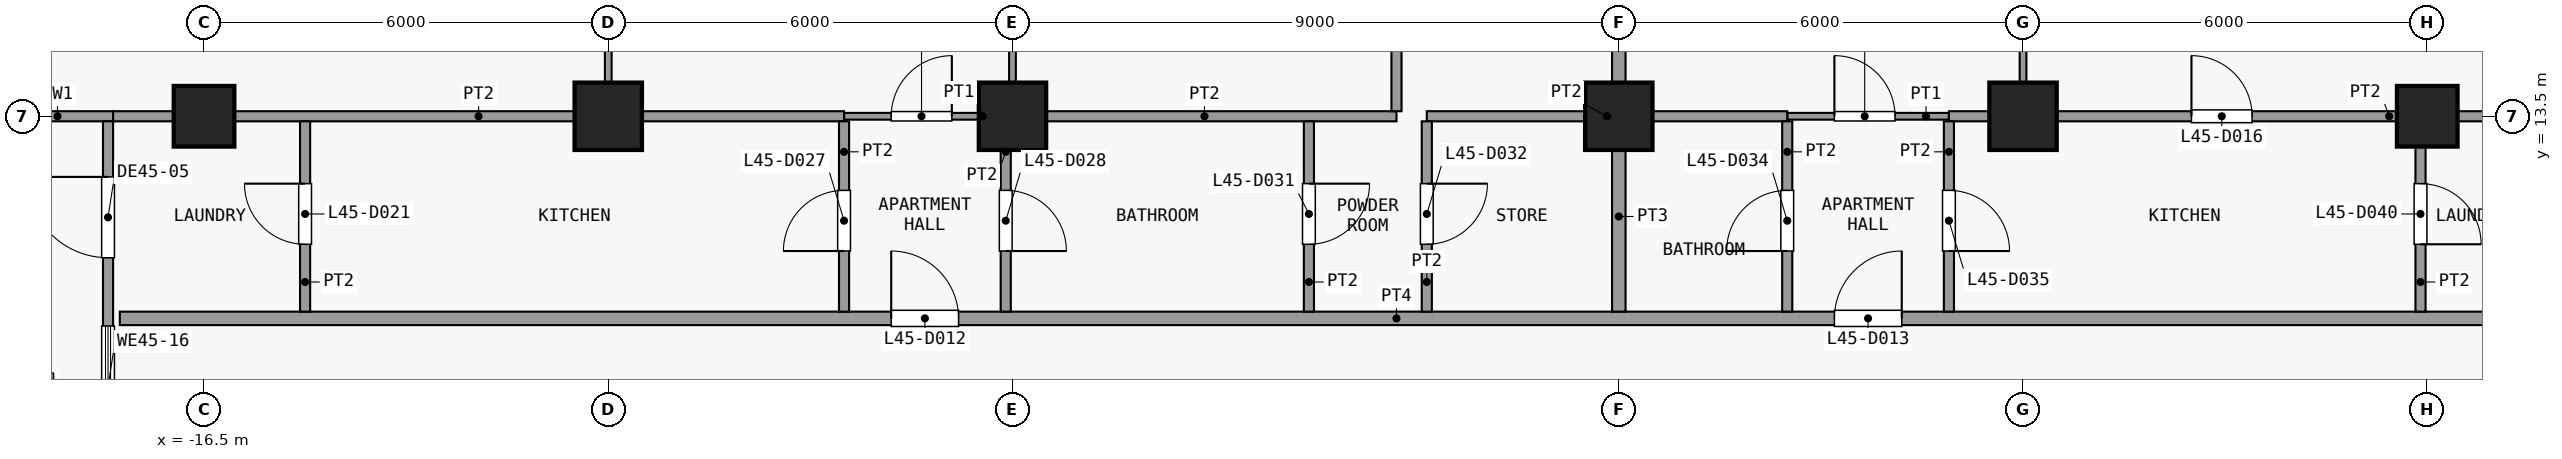
"""IFC4 building model, lengths in metres.
Left out: names, types, materials, properties, quantities, classifications, styles, units other than length and angle.
Written with IfcOpenShell. Run it as: python <this file> out.ifc"""

import sys

from ifc_helpers import new_model, si_unit, direction, frame, frame_2d, origin, origin_2d, place, context, subcontext, project, spatial, rectangle, extrude, element, fill, save


model = new_model("IFC4")
c1 = context("Model", 3, precision=1e-05, world=origin(), true_north=direction((0.0, 1.0)))
c2 = subcontext(c1, "Body", "Model", "MODEL_VIEW")
j1 = project(units=[si_unit("LENGTHUNIT", "METRE"), si_unit("PLANEANGLEUNIT", "RADIAN")], contexts=[c1])
p1 = place(None, origin())
s1 = spatial("IfcSite", under=j1, at=p1, CompositionType="ELEMENT")
p2 = place(p1, origin())
s2 = spatial("IfcBuilding", under=s1, at=p2, CompositionType="ELEMENT")
p3 = place(p2, frame((0.0, 0.0, 181.7)))
s3 = spatial("IfcBuildingStorey", under=s2, at=p3, CompositionType="ELEMENT", Elevation=181.7)
p4 = place(p3, frame((-16.5, 13.5, 0.0), z_axis=(0.0, 0.0, 1.0), x_axis=(1.0, 0.0, 0.0)))
e1 = element("IfcColumn", 1, at=p4, inside=s3, PredefinedType="COLUMN", context=c2, shape_type="SweptSolid", body=[
    extrude(rectangle(XDim=0.9, YDim=0.9, at=origin_2d()), origin(), (0.0, 0.0, 1.0), 3.6),
])
for number, where, z_axis, x_axis in (
    (2, (-10.5, 13.5, 0.0), (0.0, 0.0, 1.0), (1.0, 0.0, 0.0)),
    (3, (-4.5, 13.5, 0.0), (0.0, 0.0, 1.0), (1.0, 0.0, 0.0)),
    (4, (4.5, 13.5, 0.0), (0.0, 0.0, 1.0), (1.0, 0.0, 0.0)),
    (5, (10.5, 13.5, 0.0), (0.0, 0.0, 1.0), (1.0, 0.0, 0.0)),
):
    element("IfcColumn", number, at=place(p3, frame(where, z_axis=z_axis, x_axis=x_axis)), inside=s3, PredefinedType="COLUMN", context=c2, shape_type="SweptSolid", body=[
        extrude(rectangle(XDim=1.0, YDim=1.0, at=origin_2d()), origin(), (0.0, 0.0, 1.0), 3.6),
    ])
p5 = place(p3, frame((16.5, 13.5, 0.0), z_axis=(0.0, 0.0, 1.0), x_axis=(1.0, 0.0, 0.0)))
e6 = element("IfcColumn", 6, at=p5, inside=s3, PredefinedType="COLUMN", context=c2, shape_type="SweptSolid", body=[
    extrude(rectangle(XDim=0.9, YDim=0.9, at=origin_2d()), origin(), (0.0, 0.0, 1.0), 3.6),
])
p6 = place(p3, frame((-17.85, 13.5, 0.0), z_axis=(0.0, 0.0, 1.0), x_axis=(-1.0, 0.0, 0.0)))
e7 = element("IfcWall", 7, at=p6, inside=s3, PredefinedType="SOLIDWALL", context=c2, shape_type="SweptSolid", body=[
    extrude(rectangle(XDim=1.65, YDim=0.15, at=frame_2d((0.825, 0.0))), origin(), (0.0, 0.0, 1.0), 3.3),
])
p7 = place(p3, frame((-17.925, 7.575, 0.0), z_axis=(0.0, 0.0, 1.0), x_axis=(0.0, 1.0, 0.0)))
e8 = element("IfcWall", 8, at=p7, inside=s3, PredefinedType="SOLIDWALL", context=c2, shape_type="SweptSolid", body=[
    extrude(rectangle(XDim=5.85, YDim=0.15, at=frame_2d((2.925, 0.0))), origin(), (0.0, 0.0, 1.0), 3.3),
])
p8 = place(p7, frame((3.825, 0.0, 0.0)))
e9 = element("IfcOpeningElement", 9, at=p8, cuts=e8, PredefinedType="OPENING", context=c2, shape_type="SweptSolid", body=[
    extrude(rectangle(XDim=1.2, YDim=2.4, at=frame_2d((0.6, 1.2))), frame((0.0, 0.085, 0.0), z_axis=(0.0, -1.0, 0.0), x_axis=(1.0, 0.0, 0.0)), (0.0, 0.0, 1.0), 0.17),
])
p9 = place(p7, frame((1.012, 0.0, 0.9)))
e10 = element("IfcOpeningElement", 10, at=p9, cuts=e8, PredefinedType="OPENING", context=c2, shape_type="SweptSolid", body=[
    extrude(rectangle(XDim=1.8, YDim=2.1, at=frame_2d((0.9, 1.05))), frame((0.0, 0.085, 0.0), z_axis=(0.0, -1.0, 0.0), x_axis=(1.0, 0.0, 0.0)), (0.0, 0.0, 1.0), 0.17),
])
p10 = place(p3, frame((-17.75, 10.5, 0.0), z_axis=(0.0, 0.0, 1.0), x_axis=(1.0, 0.0, 0.0)))
e11 = element("IfcWall", 11, at=p10, inside=s3, PredefinedType="PARTITIONING", context=c2, shape_type="SweptSolid", body=[
    extrude(rectangle(XDim=35.6, YDim=0.2, at=frame_2d((17.8, 0.0))), origin(), (0.0, 0.0, 1.0), 3.3),
])
p11 = place(p10, frame((11.45, 0.0, 0.0)))
e12 = element("IfcOpeningElement", 12, at=p11, cuts=e11, PredefinedType="OPENING", context=c2, shape_type="SweptSolid", body=[
    extrude(rectangle(XDim=1.0, YDim=2.1, at=frame_2d((0.5, 1.05))), frame((0.0, 0.11, 0.0), z_axis=(0.0, -1.0, 0.0), x_axis=(1.0, 0.0, 0.0)), (0.0, 0.0, 1.0), 0.22),
])
p12 = place(p10, frame((25.45, 0.0, 0.0)))
e13 = element("IfcOpeningElement", 13, at=p12, cuts=e11, PredefinedType="OPENING", context=c2, shape_type="SweptSolid", body=[
    extrude(rectangle(XDim=1.0, YDim=2.1, at=frame_2d((0.5, 1.05))), frame((0.0, 0.11, 0.0), z_axis=(0.0, -1.0, 0.0), x_axis=(1.0, 0.0, 0.0)), (0.0, 0.0, 1.0), 0.22),
])
p13 = place(p3, frame((-7.0, 13.5, 0.0), z_axis=(0.0, 0.0, 1.0), x_axis=(1.0, 0.0, 0.0)))
e14 = element("IfcWall", 14, at=p13, inside=s3, PredefinedType="PARTITIONING", context=c2, shape_type="SweptSolid", body=[
    extrude(rectangle(XDim=2.4, YDim=0.1, at=frame_2d((1.2, 0.0))), origin(), (0.0, 0.0, 1.0), 3.3),
])
p14 = place(p13, frame((0.7, 0.0, 0.0)))
e15 = element("IfcOpeningElement", 15, at=p14, cuts=e14, PredefinedType="OPENING", context=c2, shape_type="SweptSolid", body=[
    extrude(rectangle(XDim=0.9, YDim=2.1, at=frame_2d((0.45, 1.05))), frame((0.0, 0.06, 0.0), z_axis=(0.0, -1.0, 0.0), x_axis=(1.0, 0.0, 0.0)), (0.0, 0.0, 1.0), 0.12),
])
p15 = place(p3, frame((7.0, 13.5, 0.0), z_axis=(0.0, 0.0, 1.0), x_axis=(1.0, 0.0, 0.0)))
e16 = element("IfcWall", 16, at=p15, inside=s3, PredefinedType="PARTITIONING", context=c2, shape_type="SweptSolid", body=[
    extrude(rectangle(XDim=2.4, YDim=0.1, at=frame_2d((1.2, 0.0))), origin(), (0.0, 0.0, 1.0), 3.3),
])
p16 = place(p15, frame((0.7, 0.0, 0.0)))
e17 = element("IfcOpeningElement", 17, at=p16, cuts=e16, PredefinedType="OPENING", context=c2, shape_type="SweptSolid", body=[
    extrude(rectangle(XDim=0.9, YDim=2.1, at=frame_2d((0.45, 1.05))), frame((0.0, 0.06, 0.0), z_axis=(0.0, -1.0, 0.0), x_axis=(1.0, 0.0, 0.0)), (0.0, 0.0, 1.0), 0.12),
])
p17 = place(p3, frame((-17.85, 13.5, 0.0), z_axis=(0.0, 0.0, 1.0), x_axis=(1.0, 0.0, 0.0)))
e18 = element("IfcWall", 18, at=p17, inside=s3, PredefinedType="PARTITIONING", context=c2, shape_type="SweptSolid", body=[
    extrude(rectangle(XDim=10.85, YDim=0.15, at=frame_2d((5.425, 0.0))), origin(), (0.0, 0.0, 1.0), 3.3),
])
p18 = place(p3, frame((-4.5, 13.5, 0.0), z_axis=(0.0, 0.0, 1.0), x_axis=(1.0, 0.0, 0.0)))
e19 = element("IfcWall", 19, at=p18, inside=s3, PredefinedType="PARTITIONING", context=c2, shape_type="SweptSolid", body=[
    extrude(rectangle(XDim=5.7, YDim=0.15, at=frame_2d((2.85, 0.0))), origin(), (0.0, 0.0, 1.0), 3.3),
])
p19 = place(p3, frame((1.65, 13.5, 0.0), z_axis=(0.0, 0.0, 1.0), x_axis=(1.0, 0.0, 0.0)))
e20 = element("IfcWall", 20, at=p19, inside=s3, PredefinedType="PARTITIONING", context=c2, shape_type="SweptSolid", body=[
    extrude(rectangle(XDim=5.35, YDim=0.15, at=frame_2d((2.675, 0.0))), origin(), (0.0, 0.0, 1.0), 3.3),
])
p20 = place(p3, frame((9.4, 13.5, 0.0), z_axis=(0.0, 0.0, 1.0), x_axis=(1.0, 0.0, 0.0)))
e21 = element("IfcWall", 21, at=p20, inside=s3, PredefinedType="PARTITIONING", context=c2, shape_type="SweptSolid", body=[
    extrude(rectangle(XDim=8.45, YDim=0.15, at=frame_2d((4.225, 0.0))), origin(), (0.0, 0.0, 1.0), 3.3),
])
p21 = place(p20, frame((3.6, 0.0, 0.0)))
e22 = element("IfcOpeningElement", 22, at=p21, cuts=e21, PredefinedType="OPENING", context=c2, shape_type="SweptSolid", body=[
    extrude(rectangle(XDim=0.9, YDim=2.1, at=frame_2d((0.45, 1.05))), frame((0.0, 0.085, 0.0), z_axis=(0.0, -1.0, 0.0), x_axis=(1.0, 0.0, 0.0)), (0.0, 0.0, 1.0), 0.17),
])
p22 = place(p3, frame((-15.0, 10.6, 0.0), z_axis=(0.0, 0.0, 1.0), x_axis=(0.0, 1.0, 0.0)))
e23 = element("IfcWall", 23, at=p22, inside=s3, PredefinedType="PARTITIONING", context=c2, shape_type="SweptSolid", body=[
    extrude(rectangle(XDim=2.825, YDim=0.15, at=frame_2d((1.413, 0.0))), origin(), (0.0, 0.0, 1.0), 3.3),
])
p23 = place(p22, frame((1.0, 0.0, 0.0)))
e24 = element("IfcOpeningElement", 24, at=p23, cuts=e23, PredefinedType="OPENING", context=c2, shape_type="SweptSolid", body=[
    extrude(rectangle(XDim=0.9, YDim=2.1, at=frame_2d((0.45, 1.05))), frame((0.0, 0.085, 0.0), z_axis=(0.0, -1.0, 0.0), x_axis=(1.0, 0.0, 0.0)), (0.0, 0.0, 1.0), 0.17),
])
p24 = place(p3, frame((-10.5, 13.575, 0.0), z_axis=(0.0, 0.0, 1.0), x_axis=(0.0, 1.0, 0.0)))
e25 = element("IfcWall", 25, at=p24, inside=s3, PredefinedType="PARTITIONING", context=c2, shape_type="SweptSolid", body=[
    extrude(rectangle(XDim=7.275, YDim=0.1, at=frame_2d((3.638, 0.0))), origin(), (0.0, 0.0, 1.0), 3.3),
])
p25 = place(p24, frame((2.0, 0.0, 0.0)))
e26 = element("IfcOpeningElement", 26, at=p25, cuts=e25, PredefinedType="OPENING", context=c2, shape_type="SweptSolid", body=[
    extrude(rectangle(XDim=0.9, YDim=2.1, at=frame_2d((0.45, 1.05))), frame((0.0, 0.06, 0.0), z_axis=(0.0, -1.0, 0.0), x_axis=(1.0, 0.0, 0.0)), (0.0, 0.0, 1.0), 0.12),
])
p26 = place(p3, frame((-7.0, 10.6, 0.0), z_axis=(0.0, 0.0, 1.0), x_axis=(0.0, 1.0, 0.0)))
e27 = element("IfcWall", 27, at=p26, inside=s3, PredefinedType="PARTITIONING", context=c2, shape_type="SweptSolid", body=[
    extrude(rectangle(XDim=2.825, YDim=0.15, at=frame_2d((1.413, 0.0))), origin(), (0.0, 0.0, 1.0), 3.3),
])
p27 = place(p26, frame((0.9, 0.0, 0.0)))
e28 = element("IfcOpeningElement", 28, at=p27, cuts=e27, PredefinedType="OPENING", context=c2, shape_type="SweptSolid", body=[
    extrude(rectangle(XDim=0.9, YDim=2.1, at=frame_2d((0.45, 1.05))), frame((0.0, 0.085, 0.0), z_axis=(0.0, -1.0, 0.0), x_axis=(1.0, 0.0, 0.0)), (0.0, 0.0, 1.0), 0.17),
])
p28 = place(p3, frame((-4.6, 10.6, 0.0), z_axis=(0.0, 0.0, 1.0), x_axis=(0.0, 1.0, 0.0)))
e29 = element("IfcWall", 29, at=p28, inside=s3, PredefinedType="PARTITIONING", context=c2, shape_type="SweptSolid", body=[
    extrude(rectangle(XDim=2.825, YDim=0.15, at=frame_2d((1.413, 0.0))), origin(), (0.0, 0.0, 1.0), 3.3),
])
p29 = place(p28, frame((0.9, 0.0, 0.0)))
e30 = element("IfcOpeningElement", 30, at=p29, cuts=e29, PredefinedType="OPENING", context=c2, shape_type="SweptSolid", body=[
    extrude(rectangle(XDim=0.9, YDim=2.1, at=frame_2d((0.45, 1.05))), frame((0.0, 0.085, 0.0), z_axis=(0.0, -1.0, 0.0), x_axis=(1.0, 0.0, 0.0)), (0.0, 0.0, 1.0), 0.17),
])
p30 = place(p3, frame((-4.5, 13.575, 0.0), z_axis=(0.0, 0.0, 1.0), x_axis=(0.0, 1.0, 0.0)))
e31 = element("IfcWall", 31, at=p30, inside=s3, PredefinedType="PARTITIONING", context=c2, shape_type="SweptSolid", body=[
    extrude(rectangle(XDim=7.275, YDim=0.1, at=frame_2d((3.638, 0.0))), origin(), (0.0, 0.0, 1.0), 3.3),
])
p31 = place(p30, frame((2.0, 0.0, 0.0)))
e32 = element("IfcOpeningElement", 32, at=p31, cuts=e31, PredefinedType="OPENING", context=c2, shape_type="SweptSolid", body=[
    extrude(rectangle(XDim=0.9, YDim=2.1, at=frame_2d((0.45, 1.05))), frame((0.0, 0.06, 0.0), z_axis=(0.0, -1.0, 0.0), x_axis=(1.0, 0.0, 0.0)), (0.0, 0.0, 1.0), 0.12),
])
p32 = place(p3, frame((-0.1, 10.6, 0.0), z_axis=(0.0, 0.0, 1.0), x_axis=(0.0, 1.0, 0.0)))
e33 = element("IfcWall", 33, at=p32, inside=s3, PredefinedType="PARTITIONING", context=c2, shape_type="SweptSolid", body=[
    extrude(rectangle(XDim=2.825, YDim=0.15, at=frame_2d((1.413, 0.0))), origin(), (0.0, 0.0, 1.0), 3.3),
])
p33 = place(p32, frame((1.0, 0.0, 0.0)))
e34 = element("IfcOpeningElement", 34, at=p33, cuts=e33, PredefinedType="OPENING", context=c2, shape_type="SweptSolid", body=[
    extrude(rectangle(XDim=0.9, YDim=2.1, at=frame_2d((0.45, 1.05))), frame((0.0, 0.085, 0.0), z_axis=(0.0, -1.0, 0.0), x_axis=(1.0, 0.0, 0.0)), (0.0, 0.0, 1.0), 0.17),
])
p34 = place(p3, frame((1.2, 13.575, 0.0), z_axis=(0.0, 0.0, 1.0), x_axis=(0.0, 1.0, 0.0)))
e35 = element("IfcWall", 35, at=p34, inside=s3, PredefinedType="PARTITIONING", context=c2, shape_type="SweptSolid", body=[
    extrude(rectangle(XDim=4.85, YDim=0.15, at=frame_2d((2.425, 0.0))), origin(), (0.0, 0.0, 1.0), 3.3),
])
p35 = place(p3, frame((1.65, 10.6, 0.0), z_axis=(0.0, 0.0, 1.0), x_axis=(0.0, 1.0, 0.0)))
e36 = element("IfcWall", 36, at=p35, inside=s3, PredefinedType="PARTITIONING", context=c2, shape_type="SweptSolid", body=[
    extrude(rectangle(XDim=2.825, YDim=0.15, at=frame_2d((1.413, 0.0))), origin(), (0.0, 0.0, 1.0), 3.3),
])
p36 = place(p35, frame((1.0, 0.0, 0.0)))
e37 = element("IfcOpeningElement", 37, at=p36, cuts=e36, PredefinedType="OPENING", context=c2, shape_type="SweptSolid", body=[
    extrude(rectangle(XDim=0.9, YDim=2.1, at=frame_2d((0.45, 1.05))), frame((0.0, 0.085, 0.0), z_axis=(0.0, -1.0, 0.0), x_axis=(1.0, 0.0, 0.0)), (0.0, 0.0, 1.0), 0.17),
])
p37 = place(p3, frame((4.5, 10.6, 0.0), z_axis=(0.0, 0.0, 1.0), x_axis=(0.0, 1.0, 0.0)))
e38 = element("IfcWall", 38, at=p37, inside=s3, PredefinedType="PARTITIONING", context=c2, shape_type="SweptSolid", body=[
    extrude(rectangle(XDim=2.825, YDim=0.2, at=frame_2d((1.413, 0.0))), origin(), (0.0, 0.0, 1.0), 3.3),
])
p38 = place(p3, frame((4.5, 13.575, 0.0), z_axis=(0.0, 0.0, 1.0), x_axis=(0.0, 1.0, 0.0)))
e39 = element("IfcWall", 39, at=p38, inside=s3, PredefinedType="PARTITIONING", context=c2, shape_type="SweptSolid", body=[
    extrude(rectangle(XDim=7.275, YDim=0.2, at=frame_2d((3.638, 0.0))), origin(), (0.0, 0.0, 1.0), 3.3),
])
p39 = place(p3, frame((7.0, 10.6, 0.0), z_axis=(0.0, 0.0, 1.0), x_axis=(0.0, 1.0, 0.0)))
e40 = element("IfcWall", 40, at=p39, inside=s3, PredefinedType="PARTITIONING", context=c2, shape_type="SweptSolid", body=[
    extrude(rectangle(XDim=2.825, YDim=0.15, at=frame_2d((1.413, 0.0))), origin(), (0.0, 0.0, 1.0), 3.3),
])
p40 = place(p39, frame((0.9, 0.0, 0.0)))
e41 = element("IfcOpeningElement", 41, at=p40, cuts=e40, PredefinedType="OPENING", context=c2, shape_type="SweptSolid", body=[
    extrude(rectangle(XDim=0.9, YDim=2.1, at=frame_2d((0.45, 1.05))), frame((0.0, 0.085, 0.0), z_axis=(0.0, -1.0, 0.0), x_axis=(1.0, 0.0, 0.0)), (0.0, 0.0, 1.0), 0.17),
])
p41 = place(p3, frame((9.4, 10.6, 0.0), z_axis=(0.0, 0.0, 1.0), x_axis=(0.0, 1.0, 0.0)))
e42 = element("IfcWall", 42, at=p41, inside=s3, PredefinedType="PARTITIONING", context=c2, shape_type="SweptSolid", body=[
    extrude(rectangle(XDim=2.825, YDim=0.15, at=frame_2d((1.413, 0.0))), origin(), (0.0, 0.0, 1.0), 3.3),
])
p42 = place(p41, frame((0.9, 0.0, 0.0)))
e43 = element("IfcOpeningElement", 43, at=p42, cuts=e42, PredefinedType="OPENING", context=c2, shape_type="SweptSolid", body=[
    extrude(rectangle(XDim=0.9, YDim=2.1, at=frame_2d((0.45, 1.05))), frame((0.0, 0.085, 0.0), z_axis=(0.0, -1.0, 0.0), x_axis=(1.0, 0.0, 0.0)), (0.0, 0.0, 1.0), 0.17),
])
p43 = place(p3, frame((10.5, 13.575, 0.0), z_axis=(0.0, 0.0, 1.0), x_axis=(0.0, 1.0, 0.0)))
e44 = element("IfcWall", 44, at=p43, inside=s3, PredefinedType="PARTITIONING", context=c2, shape_type="SweptSolid", body=[
    extrude(rectangle(XDim=7.275, YDim=0.1, at=frame_2d((3.638, 0.0))), origin(), (0.0, 0.0, 1.0), 3.3),
])
p44 = place(p3, frame((16.4, 10.6, 0.0), z_axis=(0.0, 0.0, 1.0), x_axis=(0.0, 1.0, 0.0)))
e45 = element("IfcWall", 45, at=p44, inside=s3, PredefinedType="PARTITIONING", context=c2, shape_type="SweptSolid", body=[
    extrude(rectangle(XDim=2.825, YDim=0.15, at=frame_2d((1.413, 0.0))), origin(), (0.0, 0.0, 1.0), 3.3),
])
p45 = place(p44, frame((1.0, 0.0, 0.0)))
e46 = element("IfcOpeningElement", 46, at=p45, cuts=e45, PredefinedType="OPENING", context=c2, shape_type="SweptSolid", body=[
    extrude(rectangle(XDim=0.9, YDim=2.1, at=frame_2d((0.45, 1.05))), frame((0.0, 0.085, 0.0), z_axis=(0.0, -1.0, 0.0), x_axis=(1.0, 0.0, 0.0)), (0.0, 0.0, 1.0), 0.17),
])
p46 = place(p8, origin())
e47 = element("IfcDoor", 47, at=p46, inside=s3, OperationType="SINGLE_SWING_RIGHT", PredefinedType="DOOR", context=c2, shape_type="SweptSolid", body=[
    extrude(rectangle(XDim=1.2, YDim=2.4, at=frame_2d((0.6, 1.2))), frame((0.0, 0.025, 0.0), z_axis=(0.0, -1.0, 0.0), x_axis=(1.0, 0.0, 0.0)), (0.0, 0.0, 1.0), 0.05),
])
fill(e9, e47)
p47 = place(p9, origin())
e48 = element("IfcWindow", 48, at=p47, inside=s3, PartitioningType="SINGLE_PANEL", PredefinedType="WINDOW", context=c2, shape_type="SweptSolid", body=[
    extrude(rectangle(XDim=1.8, YDim=2.1, at=frame_2d((0.9, 1.05))), frame((0.0, 0.03, 0.0), z_axis=(0.0, -1.0, 0.0), x_axis=(1.0, 0.0, 0.0)), (0.0, 0.0, 1.0), 0.06),
])
fill(e10, e48)
p48 = place(p11, origin())
e49 = element("IfcDoor", 49, at=p48, inside=s3, OperationType="SINGLE_SWING_RIGHT", PredefinedType="DOOR", context=c2, shape_type="SweptSolid", body=[
    extrude(rectangle(XDim=1.0, YDim=2.1, at=frame_2d((0.5, 1.05))), frame((0.0, 0.025, 0.0), z_axis=(0.0, -1.0, 0.0), x_axis=(1.0, 0.0, 0.0)), (0.0, 0.0, 1.0), 0.05),
])
fill(e12, e49)
p49 = place(p12, origin())
e50 = element("IfcDoor", 50, at=p49, inside=s3, OperationType="SINGLE_SWING_LEFT", PredefinedType="DOOR", context=c2, shape_type="SweptSolid", body=[
    extrude(rectangle(XDim=1.0, YDim=2.1, at=frame_2d((0.5, 1.05))), frame((0.0, 0.025, 0.0), z_axis=(0.0, -1.0, 0.0), x_axis=(1.0, 0.0, 0.0)), (0.0, 0.0, 1.0), 0.05),
])
fill(e13, e50)
p50 = place(p14, origin())
e51 = element("IfcDoor", 51, at=p50, inside=s3, OperationType="SINGLE_SWING_LEFT", PredefinedType="DOOR", context=c2, shape_type="SweptSolid", body=[
    extrude(rectangle(XDim=0.9, YDim=2.1, at=frame_2d((0.45, 1.05))), frame((0.0, 0.025, 0.0), z_axis=(0.0, -1.0, 0.0), x_axis=(1.0, 0.0, 0.0)), (0.0, 0.0, 1.0), 0.05),
])
fill(e15, e51)
p51 = place(p16, origin())
e52 = element("IfcDoor", 52, at=p51, inside=s3, OperationType="SINGLE_SWING_RIGHT", PredefinedType="DOOR", context=c2, shape_type="SweptSolid", body=[
    extrude(rectangle(XDim=0.9, YDim=2.1, at=frame_2d((0.45, 1.05))), frame((0.0, 0.025, 0.0), z_axis=(0.0, -1.0, 0.0), x_axis=(1.0, 0.0, 0.0)), (0.0, 0.0, 1.0), 0.05),
])
fill(e17, e52)
p52 = place(p21, origin())
e53 = element("IfcDoor", 53, at=p52, inside=s3, OperationType="SINGLE_SWING_RIGHT", PredefinedType="DOOR", context=c2, shape_type="SweptSolid", body=[
    extrude(rectangle(XDim=0.9, YDim=2.1, at=frame_2d((0.45, 1.05))), frame((0.0, 0.025, 0.0), z_axis=(0.0, -1.0, 0.0), x_axis=(1.0, 0.0, 0.0)), (0.0, 0.0, 1.0), 0.05),
])
fill(e22, e53)
p53 = place(p23, origin())
e54 = element("IfcDoor", 54, at=p53, inside=s3, OperationType="SINGLE_SWING_LEFT", PredefinedType="DOOR", context=c2, shape_type="SweptSolid", body=[
    extrude(rectangle(XDim=0.9, YDim=2.1, at=frame_2d((0.45, 1.05))), frame((0.0, 0.025, 0.0), z_axis=(0.0, -1.0, 0.0), x_axis=(1.0, 0.0, 0.0)), (0.0, 0.0, 1.0), 0.05),
])
fill(e24, e54)
p54 = place(p27, origin())
e55 = element("IfcDoor", 55, at=p54, inside=s3, OperationType="SINGLE_SWING_RIGHT", PredefinedType="DOOR", context=c2, shape_type="SweptSolid", body=[
    extrude(rectangle(XDim=0.9, YDim=2.1, at=frame_2d((0.45, 1.05))), frame((0.0, 0.025, 0.0), z_axis=(0.0, -1.0, 0.0), x_axis=(1.0, 0.0, 0.0)), (0.0, 0.0, 1.0), 0.05),
])
fill(e28, e55)
p55 = place(p29, origin())
e56 = element("IfcDoor", 56, at=p55, inside=s3, OperationType="SINGLE_SWING_LEFT", PredefinedType="DOOR", context=c2, shape_type="SweptSolid", body=[
    extrude(rectangle(XDim=0.9, YDim=2.1, at=frame_2d((0.45, 1.05))), frame((0.0, 0.025, 0.0), z_axis=(0.0, -1.0, 0.0), x_axis=(1.0, 0.0, 0.0)), (0.0, 0.0, 1.0), 0.05),
])
fill(e30, e56)
p56 = place(p33, origin())
e57 = element("IfcDoor", 57, at=p56, inside=s3, OperationType="SINGLE_SWING_RIGHT", PredefinedType="DOOR", context=c2, shape_type="SweptSolid", body=[
    extrude(rectangle(XDim=0.9, YDim=2.1, at=frame_2d((0.45, 1.05))), frame((0.0, 0.025, 0.0), z_axis=(0.0, -1.0, 0.0), x_axis=(1.0, 0.0, 0.0)), (0.0, 0.0, 1.0), 0.05),
])
fill(e34, e57)
p57 = place(p36, origin())
e58 = element("IfcDoor", 58, at=p57, inside=s3, OperationType="SINGLE_SWING_RIGHT", PredefinedType="DOOR", context=c2, shape_type="SweptSolid", body=[
    extrude(rectangle(XDim=0.9, YDim=2.1, at=frame_2d((0.45, 1.05))), frame((0.0, 0.025, 0.0), z_axis=(0.0, -1.0, 0.0), x_axis=(1.0, 0.0, 0.0)), (0.0, 0.0, 1.0), 0.05),
])
fill(e37, e58)
p58 = place(p40, origin())
e59 = element("IfcDoor", 59, at=p58, inside=s3, OperationType="SINGLE_SWING_RIGHT", PredefinedType="DOOR", context=c2, shape_type="SweptSolid", body=[
    extrude(rectangle(XDim=0.9, YDim=2.1, at=frame_2d((0.45, 1.05))), frame((0.0, 0.025, 0.0), z_axis=(0.0, -1.0, 0.0), x_axis=(1.0, 0.0, 0.0)), (0.0, 0.0, 1.0), 0.05),
])
fill(e41, e59)
p59 = place(p42, origin())
e60 = element("IfcDoor", 60, at=p59, inside=s3, OperationType="SINGLE_SWING_LEFT", PredefinedType="DOOR", context=c2, shape_type="SweptSolid", body=[
    extrude(rectangle(XDim=0.9, YDim=2.1, at=frame_2d((0.45, 1.05))), frame((0.0, 0.025, 0.0), z_axis=(0.0, -1.0, 0.0), x_axis=(1.0, 0.0, 0.0)), (0.0, 0.0, 1.0), 0.05),
])
fill(e43, e60)
p60 = place(p45, origin())
e61 = element("IfcDoor", 61, at=p60, inside=s3, OperationType="SINGLE_SWING_LEFT", PredefinedType="DOOR", context=c2, shape_type="SweptSolid", body=[
    extrude(rectangle(XDim=0.9, YDim=2.1, at=frame_2d((0.45, 1.05))), frame((0.0, 0.025, 0.0), z_axis=(0.0, -1.0, 0.0), x_axis=(1.0, 0.0, 0.0)), (0.0, 0.0, 1.0), 0.05),
])
fill(e46, e61)
save(model, sys.argv[1])
